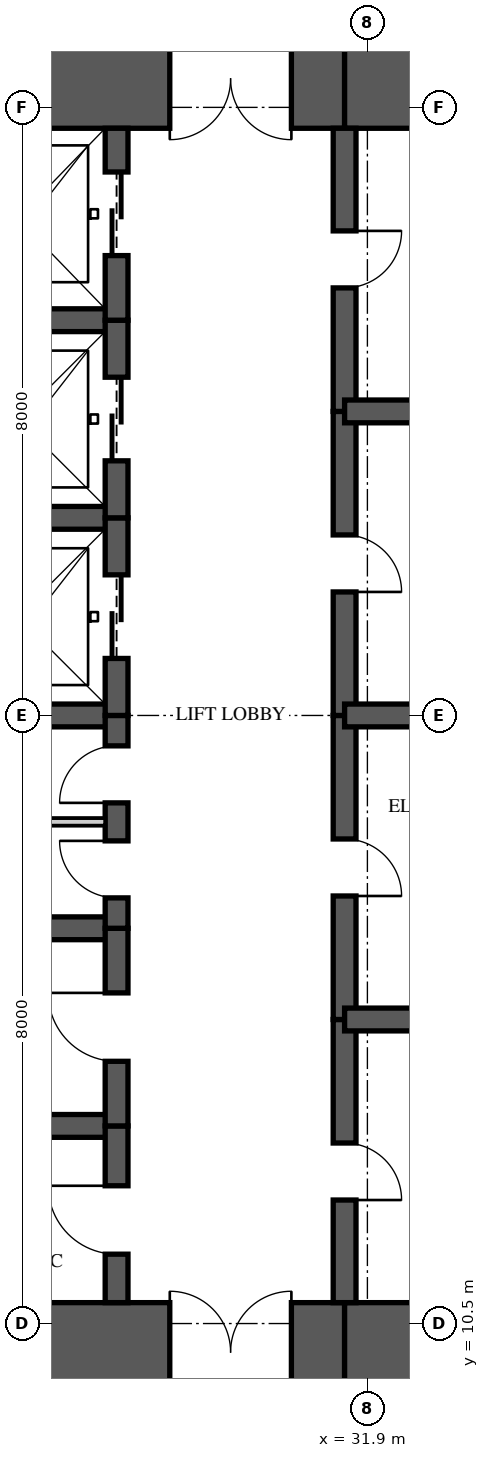
"""IFC4 building model, lengths in metres.
Left out: names, types, materials, properties, quantities, classifications, styles, units other than length and angle.
Written with IfcOpenShell. Run it as: python <this file> out.ifc"""

import sys

from ifc_helpers import new_model, si_unit, direction, frame, frame_2d, origin, place, context, subcontext, project, spatial, rectangle, extrude, element, fill, save


model = new_model("IFC4")
c1 = context("Model", 3, precision=1e-05, world=origin(), true_north=direction((0.0, 1.0)))
c2 = subcontext(c1, "Body", "Model", "MODEL_VIEW")
j1 = project(units=[si_unit("LENGTHUNIT", "METRE"), si_unit("PLANEANGLEUNIT", "RADIAN")], contexts=[c1])
p1 = place(None, origin())
s1 = spatial("IfcSite", under=j1, at=p1, CompositionType="ELEMENT")
p2 = place(p1, origin())
s2 = spatial("IfcBuilding", under=s1, at=p2, CompositionType="ELEMENT")
p3 = place(p2, frame((0.0, 0.0, 167.75)))
s3 = spatial("IfcBuildingStorey", under=s2, at=p3, CompositionType="ELEMENT", Elevation=167.75)
p4 = place(p3, frame((26.0, 10.125, 0.0), z_axis=(0.0, 0.0, 1.0), x_axis=(1.0, 0.0, 0.0)))
e1 = element("IfcWall", 1, at=p4, inside=s3, PredefinedType="SHEAR", context=c2, shape_type="SweptSolid", body=[
    extrude(rectangle(XDim=5.6, YDim=1.3, at=frame_2d((2.8, 0.0))), origin(), (0.0, 0.0, 1.0), 3.35),
])
p5 = place(p4, frame((3.3, 0.0, 0.0)))
e2 = element("IfcOpeningElement", 2, at=p5, cuts=e1, PredefinedType="OPENING", context=c2, shape_type="SweptSolid", body=[
    extrude(rectangle(XDim=1.6, YDim=2.1, at=frame_2d((0.8, 1.05))), frame((0.0, 0.66, 0.0), z_axis=(0.0, -1.0, 0.0), x_axis=(1.0, 0.0, 0.0)), (0.0, 0.0, 1.0), 1.32),
])
for number, where, z_axis, x_axis in (
    (3, (31.6, 10.125, 0.0), (0.0, 0.0, 1.0), (1.0, 0.0, 0.0)),
    (4, (35.9, 26.875, 0.0), (0.0, 0.0, 1.0), (-1.0, 0.0, 0.0)),
):
    element("IfcWall", number, at=place(p3, frame(where, z_axis=z_axis, x_axis=x_axis)), inside=s3, PredefinedType="SHEAR", context=c2, shape_type="SweptSolid", body=[
        extrude(rectangle(XDim=4.3, YDim=1.3, at=frame_2d((2.15, 0.0))), origin(), (0.0, 0.0, 1.0), 3.35),
    ])
p6 = place(p3, frame((31.6, 26.875, 0.0), z_axis=(0.0, 0.0, 1.0), x_axis=(-1.0, 0.0, 0.0)))
e5 = element("IfcWall", 5, at=p6, inside=s3, PredefinedType="SHEAR", context=c2, shape_type="SweptSolid", body=[
    extrude(rectangle(XDim=5.6, YDim=1.3, at=frame_2d((2.8, 0.0))), origin(), (0.0, 0.0, 1.0), 3.35),
])
p7 = place(p6, frame((0.7, 0.0, 0.0)))
e6 = element("IfcOpeningElement", 6, at=p7, cuts=e5, PredefinedType="OPENING", context=c2, shape_type="SweptSolid", body=[
    extrude(rectangle(XDim=1.6, YDim=2.1, at=frame_2d((0.8, 1.05))), frame((0.0, 0.66, 0.0), z_axis=(0.0, -1.0, 0.0), x_axis=(1.0, 0.0, 0.0)), (0.0, 0.0, 1.0), 1.32),
])
p8 = place(p3, frame((28.6, 10.775, 0.0), z_axis=(0.0, 0.0, 1.0), x_axis=(0.0, 1.0, 0.0)))
e7 = element("IfcWall", 7, at=p8, inside=s3, PredefinedType="SHEAR", context=c2, shape_type="SweptSolid", body=[
    extrude(rectangle(XDim=2.325, YDim=0.3, at=frame_2d((1.163, 0.0))), origin(), (0.0, 0.0, 1.0), 3.35),
])
p9 = place(p8, frame((0.637, 0.0, 0.0)))
e8 = element("IfcOpeningElement", 8, at=p9, cuts=e7, PredefinedType="OPENING", context=c2, shape_type="SweptSolid", body=[
    extrude(rectangle(XDim=0.9, YDim=2.1, at=frame_2d((0.45, 1.05))), frame((0.0, 0.16, 0.0), z_axis=(0.0, -1.0, 0.0), x_axis=(1.0, 0.0, 0.0)), (0.0, 0.0, 1.0), 0.32),
])
p10 = place(p3, frame((28.6, 13.1, 0.0), z_axis=(0.0, 0.0, 1.0), x_axis=(0.0, 1.0, 0.0)))
e9 = element("IfcWall", 9, at=p10, inside=s3, PredefinedType="SHEAR", context=c2, shape_type="SweptSolid", body=[
    extrude(rectangle(XDim=2.6, YDim=0.3, at=frame_2d((1.3, 0.0))), origin(), (0.0, 0.0, 1.0), 3.35),
])
p11 = place(p10, frame((0.85, 0.0, 0.0)))
e10 = element("IfcOpeningElement", 10, at=p11, cuts=e9, PredefinedType="OPENING", context=c2, shape_type="SweptSolid", body=[
    extrude(rectangle(XDim=0.9, YDim=2.1, at=frame_2d((0.45, 1.05))), frame((0.0, 0.16, 0.0), z_axis=(0.0, -1.0, 0.0), x_axis=(1.0, 0.0, 0.0)), (0.0, 0.0, 1.0), 0.32),
])
p12 = place(p3, frame((28.6, 15.7, 0.0), z_axis=(0.0, 0.0, 1.0), x_axis=(0.0, 1.0, 0.0)))
e11 = element("IfcWall", 11, at=p12, inside=s3, PredefinedType="SHEAR", context=c2, shape_type="SweptSolid", body=[
    extrude(rectangle(XDim=2.8, YDim=0.3, at=frame_2d((1.4, 0.0))), origin(), (0.0, 0.0, 1.0), 3.35),
])
p13 = place(p12, frame((0.4, 0.0, 0.0)))
e12 = element("IfcOpeningElement", 12, at=p13, cuts=e11, PredefinedType="OPENING", context=c2, shape_type="SweptSolid", body=[
    extrude(rectangle(XDim=0.75, YDim=2.1, at=frame_2d((0.375, 1.05))), frame((0.0, 0.16, 0.0), z_axis=(0.0, -1.0, 0.0), x_axis=(1.0, 0.0, 0.0)), (0.0, 0.0, 1.0), 0.32),
])
p14 = place(p12, frame((1.65, 0.0, 0.0)))
e13 = element("IfcOpeningElement", 13, at=p14, cuts=e11, PredefinedType="OPENING", context=c2, shape_type="SweptSolid", body=[
    extrude(rectangle(XDim=0.75, YDim=2.1, at=frame_2d((0.375, 1.05))), frame((0.0, 0.16, 0.0), z_axis=(0.0, -1.0, 0.0), x_axis=(1.0, 0.0, 0.0)), (0.0, 0.0, 1.0), 0.32),
])
p15 = place(p3, frame((28.6, 18.5, 0.0), z_axis=(0.0, 0.0, 1.0), x_axis=(0.0, 1.0, 0.0)))
e14 = element("IfcWall", 14, at=p15, inside=s3, PredefinedType="SHEAR", context=c2, shape_type="SweptSolid", body=[
    extrude(rectangle(XDim=2.6, YDim=0.3, at=frame_2d((1.3, 0.0))), origin(), (0.0, 0.0, 1.0), 3.35),
])
p16 = place(p15, frame((0.75, 0.0, 0.0)))
e15 = element("IfcOpeningElement", 15, at=p16, cuts=e14, PredefinedType="OPENING", context=c2, shape_type="SweptSolid", body=[
    extrude(rectangle(XDim=1.1, YDim=2.1, at=frame_2d((0.55, 1.05))), frame((0.0, 0.16, 0.0), z_axis=(0.0, -1.0, 0.0), x_axis=(1.0, 0.0, 0.0)), (0.0, 0.0, 1.0), 0.32),
])
p17 = place(p3, frame((28.6, 21.1, 0.0), z_axis=(0.0, 0.0, 1.0), x_axis=(0.0, 1.0, 0.0)))
e16 = element("IfcWall", 16, at=p17, inside=s3, PredefinedType="SHEAR", context=c2, shape_type="SweptSolid", body=[
    extrude(rectangle(XDim=2.6, YDim=0.3, at=frame_2d((1.3, 0.0))), origin(), (0.0, 0.0, 1.0), 3.35),
])
p18 = place(p17, frame((0.75, 0.0, 0.0)))
e17 = element("IfcOpeningElement", 17, at=p18, cuts=e16, PredefinedType="OPENING", context=c2, shape_type="SweptSolid", body=[
    extrude(rectangle(XDim=1.1, YDim=2.1, at=frame_2d((0.55, 1.05))), frame((0.0, 0.16, 0.0), z_axis=(0.0, -1.0, 0.0), x_axis=(1.0, 0.0, 0.0)), (0.0, 0.0, 1.0), 0.32),
])
p19 = place(p3, frame((28.6, 23.7, 0.0), z_axis=(0.0, 0.0, 1.0), x_axis=(0.0, 1.0, 0.0)))
e18 = element("IfcWall", 18, at=p19, inside=s3, PredefinedType="SHEAR", context=c2, shape_type="SweptSolid", body=[
    extrude(rectangle(XDim=2.525, YDim=0.3, at=frame_2d((1.263, 0.0))), origin(), (0.0, 0.0, 1.0), 3.35),
])
p20 = place(p19, frame((0.85, 0.0, 0.0)))
e19 = element("IfcOpeningElement", 19, at=p20, cuts=e18, PredefinedType="OPENING", context=c2, shape_type="SweptSolid", body=[
    extrude(rectangle(XDim=1.1, YDim=2.1, at=frame_2d((0.55, 1.05))), frame((0.0, 0.16, 0.0), z_axis=(0.0, -1.0, 0.0), x_axis=(1.0, 0.0, 0.0)), (0.0, 0.0, 1.0), 0.32),
])
p21 = place(p3, frame((31.6, 10.775, 0.0), z_axis=(0.0, 0.0, 1.0), x_axis=(0.0, 1.0, 0.0)))
e20 = element("IfcWall", 20, at=p21, inside=s3, PredefinedType="SHEAR", context=c2, shape_type="SweptSolid", body=[
    extrude(rectangle(XDim=3.725, YDim=0.3, at=frame_2d((1.863, 0.0))), origin(), (0.0, 0.0, 1.0), 3.35),
])
p22 = place(p21, frame((1.35, 0.0, 0.0)))
e21 = element("IfcOpeningElement", 21, at=p22, cuts=e20, PredefinedType="OPENING", context=c2, shape_type="SweptSolid", body=[
    extrude(rectangle(XDim=0.75, YDim=2.1, at=frame_2d((0.375, 1.05))), frame((0.0, 0.16, 0.0), z_axis=(0.0, -1.0, 0.0), x_axis=(1.0, 0.0, 0.0)), (0.0, 0.0, 1.0), 0.32),
])
p23 = place(p3, frame((31.6, 14.5, 0.0), z_axis=(0.0, 0.0, 1.0), x_axis=(0.0, 1.0, 0.0)))
e22 = element("IfcWall", 22, at=p23, inside=s3, PredefinedType="SHEAR", context=c2, shape_type="SweptSolid", body=[
    extrude(rectangle(XDim=4.0, YDim=0.3, at=frame_2d((2.0, 0.0))), origin(), (0.0, 0.0, 1.0), 3.35),
])
p24 = place(p23, frame((1.625, 0.0, 0.0)))
e23 = element("IfcOpeningElement", 23, at=p24, cuts=e22, PredefinedType="OPENING", context=c2, shape_type="SweptSolid", body=[
    extrude(rectangle(XDim=0.75, YDim=2.1, at=frame_2d((0.375, 1.05))), frame((0.0, 0.16, 0.0), z_axis=(0.0, -1.0, 0.0), x_axis=(1.0, 0.0, 0.0)), (0.0, 0.0, 1.0), 0.32),
])
p25 = place(p3, frame((31.6, 18.5, 0.0), z_axis=(0.0, 0.0, 1.0), x_axis=(0.0, 1.0, 0.0)))
e24 = element("IfcWall", 24, at=p25, inside=s3, PredefinedType="SHEAR", context=c2, shape_type="SweptSolid", body=[
    extrude(rectangle(XDim=4.0, YDim=0.3, at=frame_2d((2.0, 0.0))), origin(), (0.0, 0.0, 1.0), 3.35),
])
p26 = place(p25, frame((1.625, 0.0, 0.0)))
e25 = element("IfcOpeningElement", 25, at=p26, cuts=e24, PredefinedType="OPENING", context=c2, shape_type="SweptSolid", body=[
    extrude(rectangle(XDim=0.75, YDim=2.1, at=frame_2d((0.375, 1.05))), frame((0.0, 0.16, 0.0), z_axis=(0.0, -1.0, 0.0), x_axis=(1.0, 0.0, 0.0)), (0.0, 0.0, 1.0), 0.32),
])
p27 = place(p3, frame((31.6, 22.5, 0.0), z_axis=(0.0, 0.0, 1.0), x_axis=(0.0, 1.0, 0.0)))
e26 = element("IfcWall", 26, at=p27, inside=s3, PredefinedType="SHEAR", context=c2, shape_type="SweptSolid", body=[
    extrude(rectangle(XDim=3.725, YDim=0.3, at=frame_2d((1.863, 0.0))), origin(), (0.0, 0.0, 1.0), 3.35),
])
p28 = place(p27, frame((1.625, 0.0, 0.0)))
e27 = element("IfcOpeningElement", 27, at=p28, cuts=e26, PredefinedType="OPENING", context=c2, shape_type="SweptSolid", body=[
    extrude(rectangle(XDim=0.75, YDim=2.1, at=frame_2d((0.375, 1.05))), frame((0.0, 0.16, 0.0), z_axis=(0.0, -1.0, 0.0), x_axis=(1.0, 0.0, 0.0)), (0.0, 0.0, 1.0), 0.32),
])
for number, where, z_axis, x_axis in (
    (28, (26.0, 13.1, 0.0), (0.0, 0.0, 1.0), (1.0, 0.0, 0.0)),
    (29, (26.0, 15.7, 0.0), (0.0, 0.0, 1.0), (1.0, 0.0, 0.0)),
    (30, (26.0, 18.5, 0.0), (0.0, 0.0, 1.0), (1.0, 0.0, 0.0)),
    (31, (26.0, 21.1, 0.0), (0.0, 0.0, 1.0), (1.0, 0.0, 0.0)),
    (32, (26.0, 23.7, 0.0), (0.0, 0.0, 1.0), (1.0, 0.0, 0.0)),
):
    element("IfcWall", number, at=place(p3, frame(where, z_axis=z_axis, x_axis=x_axis)), inside=s3, PredefinedType="SHEAR", context=c2, shape_type="SweptSolid", body=[
        extrude(rectangle(XDim=2.6, YDim=0.3, at=frame_2d((1.3, 0.0))), origin(), (0.0, 0.0, 1.0), 3.35),
    ])
for number, where, z_axis, x_axis in (
    (33, (31.6, 14.5, 0.0), (0.0, 0.0, 1.0), (1.0, 0.0, 0.0)),
    (34, (31.6, 18.5, 0.0), (0.0, 0.0, 1.0), (1.0, 0.0, 0.0)),
    (35, (31.6, 22.5, 0.0), (0.0, 0.0, 1.0), (1.0, 0.0, 0.0)),
):
    element("IfcWall", number, at=place(p3, frame(where, z_axis=z_axis, x_axis=x_axis)), inside=s3, PredefinedType="SHEAR", context=c2, shape_type="SweptSolid", body=[
        extrude(rectangle(XDim=4.3, YDim=0.3, at=frame_2d((2.15, 0.0))), origin(), (0.0, 0.0, 1.0), 3.35),
    ])
p29 = place(p3, frame((26.15, 17.1, 0.0), z_axis=(0.0, 0.0, 1.0), x_axis=(1.0, 0.0, 0.0)))
e36 = element("IfcWall", 36, at=p29, inside=s3, PredefinedType="PARTITIONING", context=c2, shape_type="SweptSolid", body=[
    extrude(rectangle(XDim=2.3, YDim=0.1, at=frame_2d((1.15, 0.0))), origin(), (0.0, 0.0, 1.0), 3.11),
])
p30 = place(p16, origin())
e37 = element("IfcDoor", 37, at=p30, inside=s3, OperationType="SLIDING_TO_LEFT", PredefinedType="DOOR", context=c2, shape_type="SweptSolid", body=[
    extrude(rectangle(XDim=1.1, YDim=2.1, at=frame_2d((0.55, 1.05))), frame((0.0, 0.025, 0.0), z_axis=(0.0, -1.0, 0.0), x_axis=(1.0, 0.0, 0.0)), (0.0, 0.0, 1.0), 0.05),
])
fill(e15, e37)
p31 = place(p18, origin())
e38 = element("IfcDoor", 38, at=p31, inside=s3, OperationType="SLIDING_TO_LEFT", PredefinedType="DOOR", context=c2, shape_type="SweptSolid", body=[
    extrude(rectangle(XDim=1.1, YDim=2.1, at=frame_2d((0.55, 1.05))), frame((0.0, 0.025, 0.0), z_axis=(0.0, -1.0, 0.0), x_axis=(1.0, 0.0, 0.0)), (0.0, 0.0, 1.0), 0.05),
])
fill(e17, e38)
p32 = place(p20, origin())
e39 = element("IfcDoor", 39, at=p32, inside=s3, OperationType="SLIDING_TO_LEFT", PredefinedType="DOOR", context=c2, shape_type="SweptSolid", body=[
    extrude(rectangle(XDim=1.1, YDim=2.1, at=frame_2d((0.55, 1.05))), frame((0.0, 0.025, 0.0), z_axis=(0.0, -1.0, 0.0), x_axis=(1.0, 0.0, 0.0)), (0.0, 0.0, 1.0), 0.05),
])
fill(e19, e39)
p33 = place(p9, origin())
e40 = element("IfcDoor", 40, at=p33, inside=s3, OperationType="SINGLE_SWING_RIGHT", PredefinedType="DOOR", context=c2, shape_type="SweptSolid", body=[
    extrude(rectangle(XDim=0.9, YDim=2.1, at=frame_2d((0.45, 1.05))), frame((0.0, 0.025, 0.0), z_axis=(0.0, -1.0, 0.0), x_axis=(1.0, 0.0, 0.0)), (0.0, 0.0, 1.0), 0.05),
])
fill(e8, e40)
p34 = place(p11, origin())
e41 = element("IfcDoor", 41, at=p34, inside=s3, OperationType="SINGLE_SWING_RIGHT", PredefinedType="DOOR", context=c2, shape_type="SweptSolid", body=[
    extrude(rectangle(XDim=0.9, YDim=2.1, at=frame_2d((0.45, 1.05))), frame((0.0, 0.025, 0.0), z_axis=(0.0, -1.0, 0.0), x_axis=(1.0, 0.0, 0.0)), (0.0, 0.0, 1.0), 0.05),
])
fill(e10, e41)
p35 = place(p13, origin())
e42 = element("IfcDoor", 42, at=p35, inside=s3, OperationType="SINGLE_SWING_RIGHT", PredefinedType="DOOR", context=c2, shape_type="SweptSolid", body=[
    extrude(rectangle(XDim=0.75, YDim=2.1, at=frame_2d((0.375, 1.05))), frame((0.0, 0.025, 0.0), z_axis=(0.0, -1.0, 0.0), x_axis=(1.0, 0.0, 0.0)), (0.0, 0.0, 1.0), 0.05),
])
fill(e12, e42)
p36 = place(p14, origin())
e43 = element("IfcDoor", 43, at=p36, inside=s3, OperationType="SINGLE_SWING_LEFT", PredefinedType="DOOR", context=c2, shape_type="SweptSolid", body=[
    extrude(rectangle(XDim=0.75, YDim=2.1, at=frame_2d((0.375, 1.05))), frame((0.0, 0.025, 0.0), z_axis=(0.0, -1.0, 0.0), x_axis=(1.0, 0.0, 0.0)), (0.0, 0.0, 1.0), 0.05),
])
fill(e13, e43)
p37 = place(p5, origin())
e44 = element("IfcDoor", 44, at=p37, inside=s3, OperationType="DOUBLE_DOOR_SINGLE_SWING", PredefinedType="DOOR", context=c2, shape_type="SweptSolid", body=[
    extrude(rectangle(XDim=1.6, YDim=2.1, at=frame_2d((0.8, 1.05))), frame((0.0, 0.025, 0.0), z_axis=(0.0, -1.0, 0.0), x_axis=(1.0, 0.0, 0.0)), (0.0, 0.0, 1.0), 0.05),
])
fill(e2, e44)
p38 = place(p7, origin())
e45 = element("IfcDoor", 45, at=p38, inside=s3, OperationType="DOUBLE_DOOR_SINGLE_SWING", PredefinedType="DOOR", context=c2, shape_type="SweptSolid", body=[
    extrude(rectangle(XDim=1.6, YDim=2.1, at=frame_2d((0.8, 1.05))), frame((0.0, 0.025, 0.0), z_axis=(0.0, -1.0, 0.0), x_axis=(1.0, 0.0, 0.0)), (0.0, 0.0, 1.0), 0.05),
])
fill(e6, e45)
p39 = place(p22, frame((0.75, 0.0, 0.0), z_axis=(0.0, 0.0, 1.0), x_axis=(-1.0, 0.0, 0.0)))
e46 = element("IfcDoor", 46, at=p39, inside=s3, OperationType="SINGLE_SWING_RIGHT", PredefinedType="DOOR", context=c2, shape_type="SweptSolid", body=[
    extrude(rectangle(XDim=0.75, YDim=2.1, at=frame_2d((0.375, 1.05))), frame((0.0, 0.025, 0.0), z_axis=(0.0, -1.0, 0.0), x_axis=(1.0, 0.0, 0.0)), (0.0, 0.0, 1.0), 0.05),
])
fill(e21, e46)
p40 = place(p24, frame((0.75, 0.0, 0.0), z_axis=(0.0, 0.0, 1.0), x_axis=(-1.0, 0.0, 0.0)))
e47 = element("IfcDoor", 47, at=p40, inside=s3, OperationType="SINGLE_SWING_RIGHT", PredefinedType="DOOR", context=c2, shape_type="SweptSolid", body=[
    extrude(rectangle(XDim=0.75, YDim=2.1, at=frame_2d((0.375, 1.05))), frame((0.0, 0.025, 0.0), z_axis=(0.0, -1.0, 0.0), x_axis=(1.0, 0.0, 0.0)), (0.0, 0.0, 1.0), 0.05),
])
fill(e23, e47)
p41 = place(p26, frame((0.75, 0.0, 0.0), z_axis=(0.0, 0.0, 1.0), x_axis=(-1.0, 0.0, 0.0)))
e48 = element("IfcDoor", 48, at=p41, inside=s3, OperationType="SINGLE_SWING_RIGHT", PredefinedType="DOOR", context=c2, shape_type="SweptSolid", body=[
    extrude(rectangle(XDim=0.75, YDim=2.1, at=frame_2d((0.375, 1.05))), frame((0.0, 0.025, 0.0), z_axis=(0.0, -1.0, 0.0), x_axis=(1.0, 0.0, 0.0)), (0.0, 0.0, 1.0), 0.05),
])
fill(e25, e48)
p42 = place(p28, frame((0.75, 0.0, 0.0), z_axis=(0.0, 0.0, 1.0), x_axis=(-1.0, 0.0, 0.0)))
e49 = element("IfcDoor", 49, at=p42, inside=s3, OperationType="SINGLE_SWING_LEFT", PredefinedType="DOOR", context=c2, shape_type="SweptSolid", body=[
    extrude(rectangle(XDim=0.75, YDim=2.1, at=frame_2d((0.375, 1.05))), frame((0.0, 0.025, 0.0), z_axis=(0.0, -1.0, 0.0), x_axis=(1.0, 0.0, 0.0)), (0.0, 0.0, 1.0), 0.05),
])
fill(e27, e49)
save(model, sys.argv[1])
